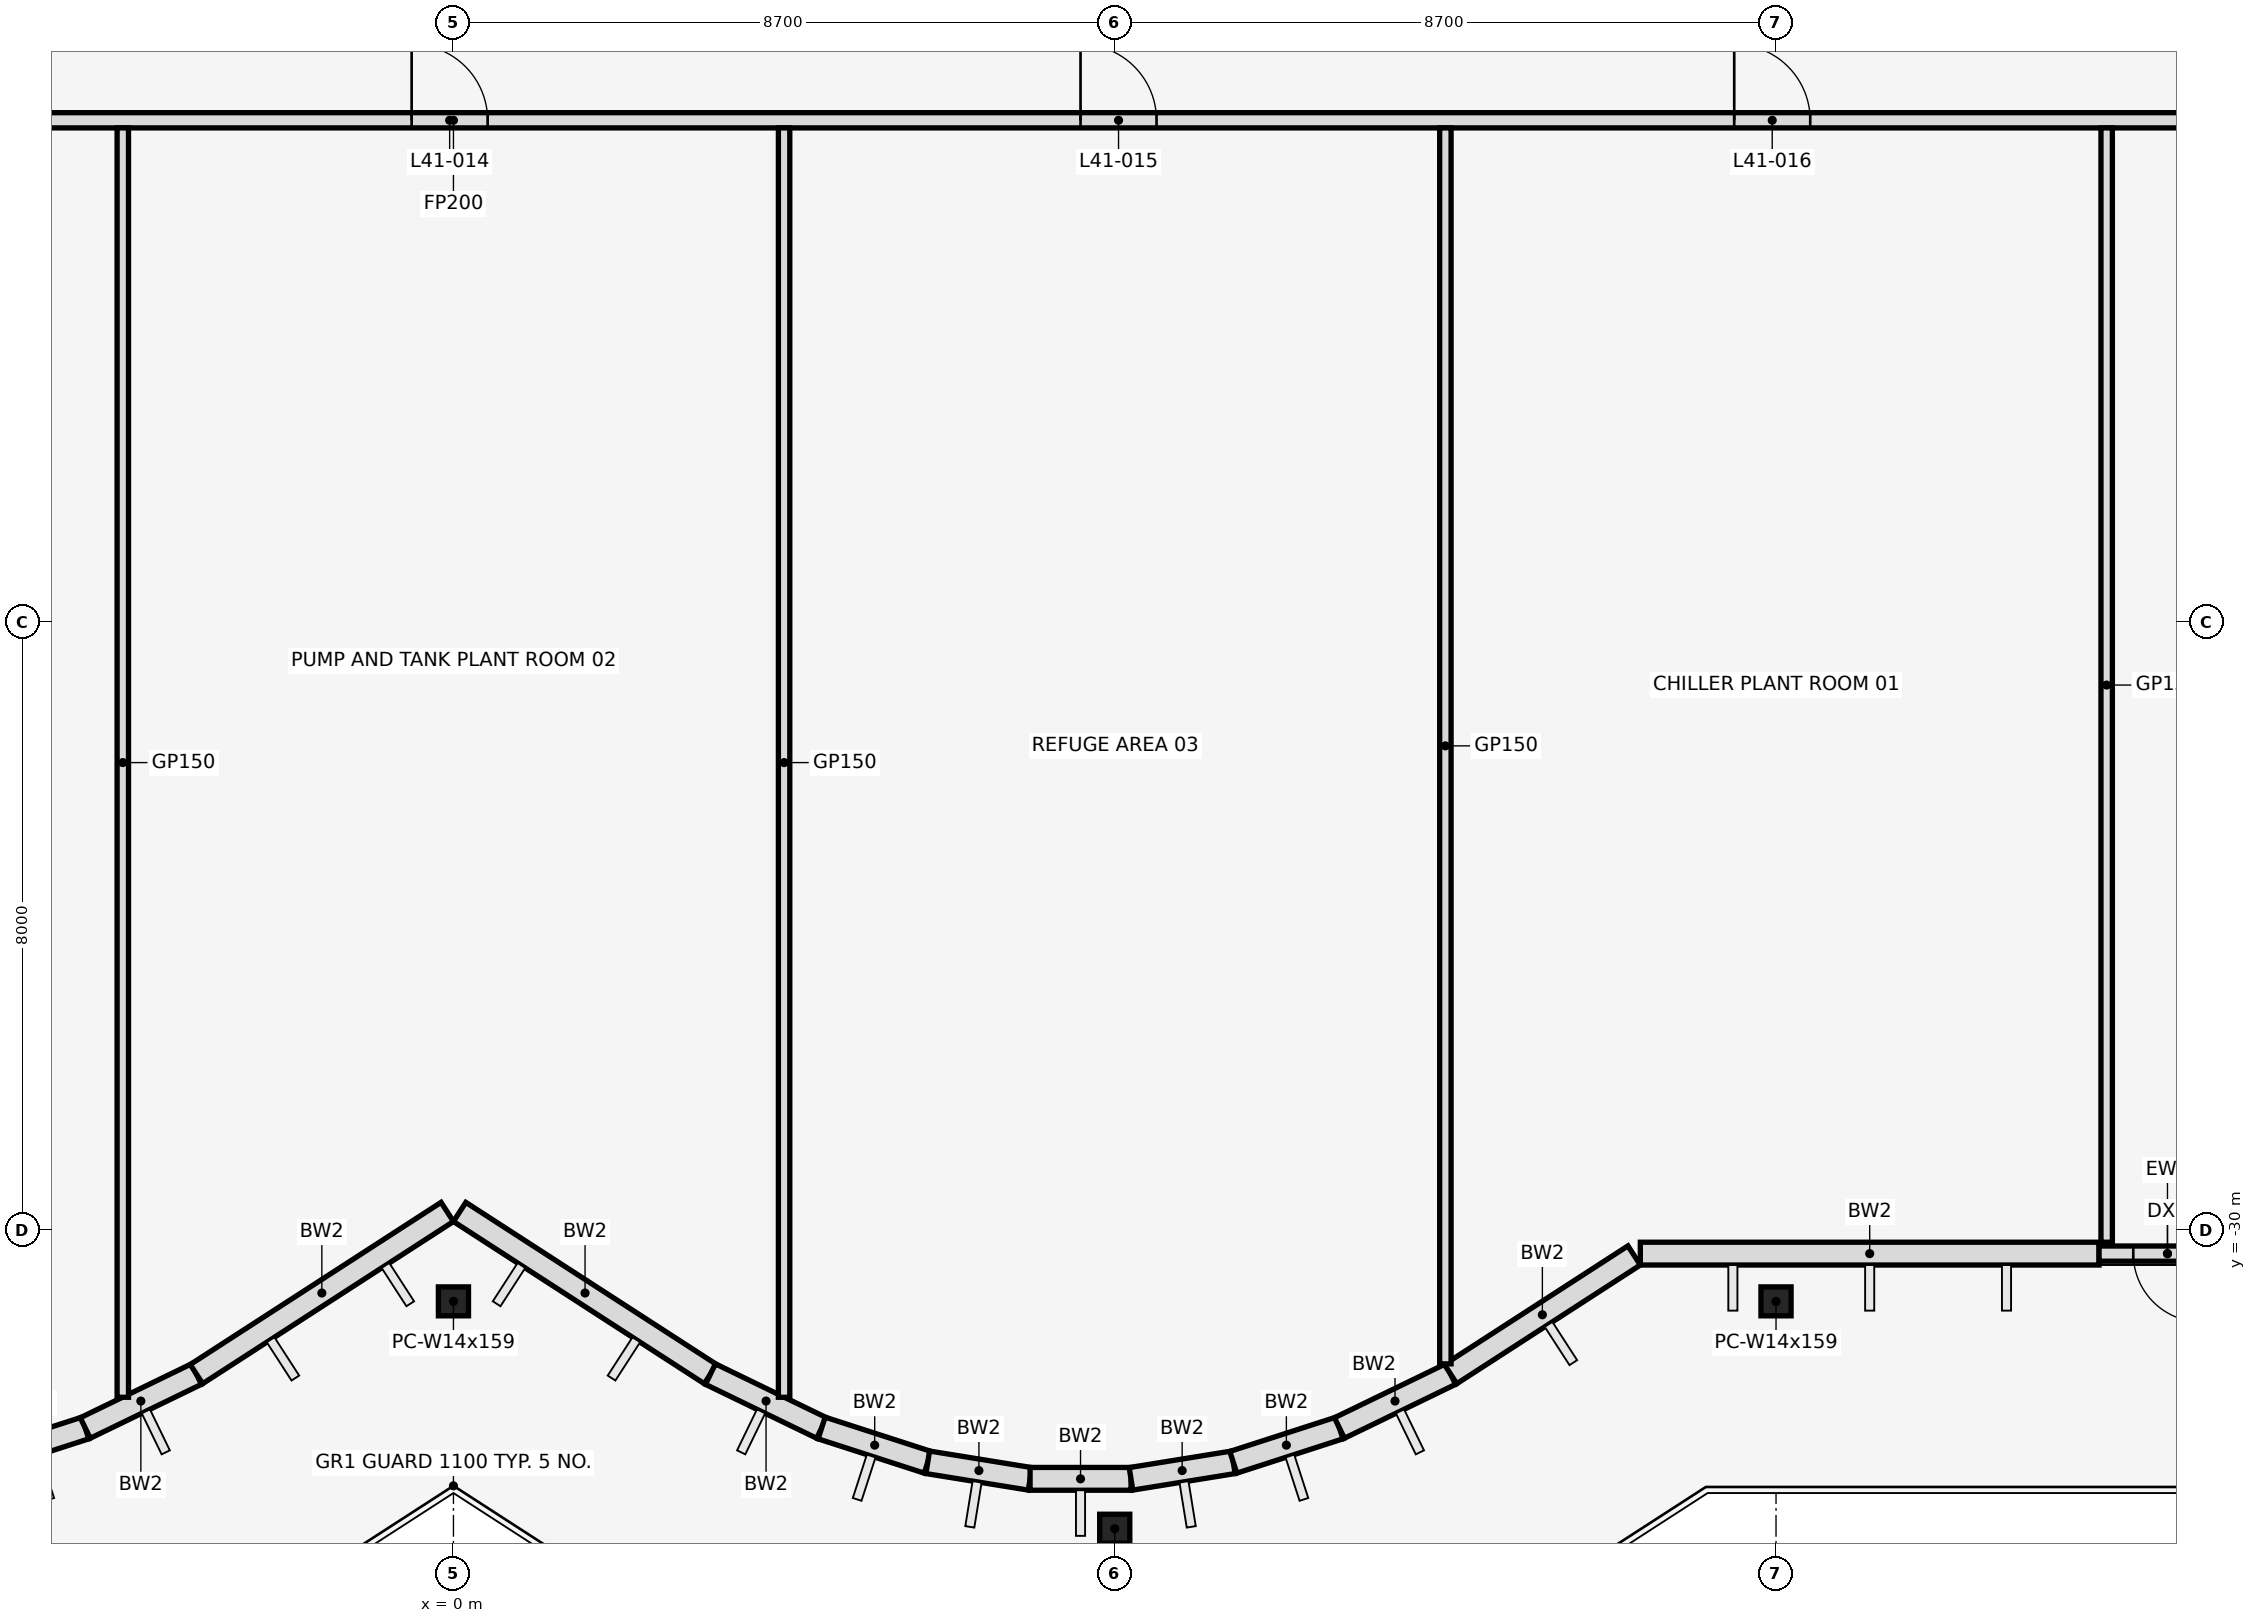
"""IFC4 building model, lengths in metres.
Left out: names, types, materials, properties, quantities, classifications, styles, units other than length and angle.
Written with IfcOpenShell. Run it as: python <this file> out.ifc"""

import sys

from ifc_helpers import new_model, si_unit, direction, frame, frame_2d, origin, origin_2d, place, context, subcontext, project, spatial, rectangle, i_section, extrude, element, fill, save


model = new_model("IFC4")
c1 = context("Model", 3, precision=1e-05, world=origin(), true_north=direction((0.0, 1.0)))
c2 = subcontext(c1, "Body", "Model", "MODEL_VIEW")
j1 = project(units=[si_unit("LENGTHUNIT", "METRE"), si_unit("PLANEANGLEUNIT", "RADIAN")], contexts=[c1])
p1 = place(None, origin())
s1 = spatial("IfcSite", under=j1, at=p1, CompositionType="ELEMENT")
p2 = place(p1, origin())
s2 = spatial("IfcBuilding", under=s1, at=p2, CompositionType="ELEMENT")
p3 = place(p2, frame((0.0, 0.0, 185.5)))
s3 = spatial("IfcBuildingStorey", under=s2, at=p3, CompositionType="ELEMENT", Elevation=185.5)
for number, where, z_axis, x_axis in (
    (1, (0.0, -30.938, 0.0), (0.0, 0.0, 1.0), (1.0, 0.0, 0.0)),
    (2, (8.7, -33.929, 0.0), (0.0, 0.0, 1.0), (1.0, 0.0, 0.0)),
    (3, (17.4, -30.938, 0.0), (0.0, 0.0, 1.0), (1.0, 0.0, 0.0)),
):
    element("IfcColumn", number, at=place(p3, frame(where, z_axis=z_axis, x_axis=x_axis)), inside=s3, PredefinedType="COLUMN", context=c2, shape_type="SweptSolid", body=[
        extrude(i_section(OverallWidth=0.396, OverallDepth=0.381, WebThickness=0.019, FlangeThickness=0.03, at=origin_2d()), origin(), (0.0, 0.0, 1.0), 5.4),
    ])
p4 = place(p3, frame((-6.24, -33.055, 0.0), z_axis=(0.0, 0.0, 1.0), x_axis=(0.951539081691, 0.307527845919, 0.0)))
e4 = element("IfcWall", 4, at=p4, inside=s3, PredefinedType="STANDARD", context=c2, shape_type="SweptSolid", body=[
    extrude(rectangle(XDim=1.467, YDim=0.3, at=frame_2d((0.733, 0.0))), origin(), (0.0, 0.0, 1.0), 5.25),
])
p5 = place(p3, frame((-4.844, -32.604, 0.0), z_axis=(0.0, 0.0, 1.0), x_axis=(0.899798026589, 0.436306671214, 0.0)))
e5 = element("IfcWall", 5, at=p5, inside=s3, PredefinedType="STANDARD", context=c2, shape_type="SweptSolid", body=[
    extrude(rectangle(XDim=1.625, YDim=0.3, at=frame_2d((0.813, 0.0))), origin(), (0.0, 0.0, 1.0), 4.346),
])
for number, where, z_axis, x_axis in (
    (6, (-3.381, -31.895, 0.0), (0.0, 0.0, 1.0), (0.84, 0.543, 0.0)),
    (7, (0.081, -29.762, 0.0), (0.0, 0.0, 1.0), (0.84, -0.543, 0.0)),
):
    element("IfcWall", number, at=place(p3, frame(where, z_axis=z_axis, x_axis=x_axis)), inside=s3, PredefinedType="STANDARD", context=c2, shape_type="SweptSolid", body=[
        extrude(rectangle(XDim=3.929, YDim=0.3, at=frame_2d((1.965, 0.0))), origin(), (0.0, 0.0, 1.0), 4.414),
    ])
p6 = place(p3, frame((3.381, -31.895, 0.0), z_axis=(0.0, 0.0, 1.0), x_axis=(0.899798026589, -0.436306671214, 0.0)))
e8 = element("IfcWall", 8, at=p6, inside=s3, PredefinedType="STANDARD", context=c2, shape_type="SweptSolid", body=[
    extrude(rectangle(XDim=1.625, YDim=0.3, at=frame_2d((0.813, 0.0))), origin(), (0.0, 0.0, 1.0), 4.346),
])
p7 = place(p3, frame((4.844, -32.604, 0.0), z_axis=(0.0, 0.0, 1.0), x_axis=(0.951539081691, -0.307527845919, 0.0)))
e9 = element("IfcWall", 9, at=p7, inside=s3, PredefinedType="STANDARD", context=c2, shape_type="SweptSolid", body=[
    extrude(rectangle(XDim=1.467, YDim=0.3, at=frame_2d((0.733, 0.0))), origin(), (0.0, 0.0, 1.0), 5.25),
])
p8 = place(p3, frame((6.24, -33.055, 0.0), z_axis=(0.0, 0.0, 1.0), x_axis=(0.987194777017, -0.15951950423, 0.0)))
e10 = element("IfcWall", 10, at=p8, inside=s3, PredefinedType="STANDARD", context=c2, shape_type="SweptSolid", body=[
    extrude(rectangle(XDim=1.364, YDim=0.3, at=frame_2d((0.682, 0.0))), origin(), (0.0, 0.0, 1.0), 5.25),
])
p9 = place(p3, frame((7.586, -33.273, 0.0), z_axis=(0.0, 0.0, 1.0), x_axis=(1.0, 0.0, 0.0)))
e11 = element("IfcWall", 11, at=p9, inside=s3, PredefinedType="STANDARD", context=c2, shape_type="SweptSolid", body=[
    extrude(rectangle(XDim=1.328, YDim=0.3, at=frame_2d((0.664, 0.0))), origin(), (0.0, 0.0, 1.0), 4.28),
])
p10 = place(p3, frame((8.914, -33.273, 0.0), z_axis=(0.0, 0.0, 1.0), x_axis=(0.987194777017, 0.15951950423, 0.0)))
e12 = element("IfcWall", 12, at=p10, inside=s3, PredefinedType="STANDARD", context=c2, shape_type="SweptSolid", body=[
    extrude(rectangle(XDim=1.364, YDim=0.3, at=frame_2d((0.682, 0.0))), origin(), (0.0, 0.0, 1.0), 4.28),
])
p11 = place(p3, frame((10.26, -33.055, 0.0), z_axis=(0.0, 0.0, 1.0), x_axis=(0.951539081691, 0.307527845919, 0.0)))
e13 = element("IfcWall", 13, at=p11, inside=s3, PredefinedType="STANDARD", context=c2, shape_type="SweptSolid", body=[
    extrude(rectangle(XDim=1.467, YDim=0.3, at=frame_2d((0.733, 0.0))), origin(), (0.0, 0.0, 1.0), 5.25),
])
p12 = place(p3, frame((11.656, -32.604, 0.0), z_axis=(0.0, 0.0, 1.0), x_axis=(0.899798026589, 0.436306671214, 0.0)))
e14 = element("IfcWall", 14, at=p12, inside=s3, PredefinedType="STANDARD", context=c2, shape_type="SweptSolid", body=[
    extrude(rectangle(XDim=1.625, YDim=0.3, at=frame_2d((0.813, 0.0))), origin(), (0.0, 0.0, 1.0), 4.346),
])
p13 = place(p3, frame((13.119, -31.895, 0.0), z_axis=(0.0, 0.0, 1.0), x_axis=(0.839779682339, 0.542927329512, 0.0)))
e15 = element("IfcWall", 15, at=p13, inside=s3, PredefinedType="STANDARD", context=c2, shape_type="SweptSolid", body=[
    extrude(rectangle(XDim=2.875, YDim=0.3, at=frame_2d((1.438, 0.0))), origin(), (0.0, 0.0, 1.0), 4.346),
])
p14 = place(p3, frame((15.615, -30.31, 0.0), z_axis=(0.0, 0.0, 1.0), x_axis=(1.0, 0.0, 0.0)))
e16 = element("IfcWall", 16, at=p14, inside=s3, PredefinedType="STANDARD", context=c2, shape_type="SweptSolid", body=[
    extrude(rectangle(XDim=6.035, YDim=0.3, at=frame_2d((3.018, 0.0))), origin(), (0.0, 0.0, 1.0), 4.414),
])
p15 = place(p3, frame((23.45, -30.31, 0.0), z_axis=(0.0, 0.0, 1.0), x_axis=(-1.0, 0.0, 0.0)))
e17 = element("IfcWall", 17, at=p15, inside=s3, PredefinedType="STANDARD", context=c2, shape_type="SweptSolid", body=[
    extrude(rectangle(XDim=1.8, YDim=0.2, at=frame_2d((0.9, 0.0))), origin(), (0.0, 0.0, 1.0), 5.25),
])
p16 = place(p15, frame((0.45, 0.0, 0.0)))
e18 = element("IfcOpeningElement", 18, at=p16, cuts=e17, PredefinedType="OPENING", context=c2, shape_type="SweptSolid", body=[
    extrude(rectangle(XDim=0.9, YDim=2.1, at=frame_2d((0.45, 1.05))), frame((0.0, 0.112, 0.0), z_axis=(0.0, -1.0, 0.0), x_axis=(1.0, 0.0, 0.0)), (0.0, 0.0, 1.0), 0.224),
])
p17 = place(p3, frame((-32.7, -15.4, 0.0), z_axis=(0.0, 0.0, 1.0), x_axis=(1.0, 0.0, 0.0)))
e19 = element("IfcWall", 19, at=p17, inside=s3, PredefinedType="PARTITIONING", context=c2, shape_type="SweptSolid", body=[
    extrude(rectangle(XDim=65.4, YDim=0.2, at=frame_2d((32.7, 0.0))), origin(), (0.0, 0.0, 1.0), 4.26),
])
p18 = place(p17, frame((0.7, 0.0, 0.0)))
e20 = element("IfcOpeningElement", 20, at=p18, cuts=e19, PredefinedType="OPENING", context=c2, shape_type="SweptSolid", body=[
    extrude(rectangle(XDim=0.9, YDim=2.1, at=frame_2d((0.45, 1.05))), frame((0.0, 0.112, 0.0), z_axis=(0.0, -1.0, 0.0), x_axis=(1.0, 0.0, 0.0)), (0.0, 0.0, 1.0), 0.224),
])
p19 = place(p17, frame((5.55, 0.0, 0.0)))
e21 = element("IfcOpeningElement", 21, at=p19, cuts=e19, PredefinedType="OPENING", context=c2, shape_type="SweptSolid", body=[
    extrude(rectangle(XDim=1.0, YDim=2.1, at=frame_2d((0.5, 1.05))), frame((0.0, 0.112, 0.0), z_axis=(0.0, -1.0, 0.0), x_axis=(1.0, 0.0, 0.0)), (0.0, 0.0, 1.0), 0.224),
])
p20 = place(p17, frame((14.85, 0.0, 0.0)))
e22 = element("IfcOpeningElement", 22, at=p20, cuts=e19, PredefinedType="OPENING", context=c2, shape_type="SweptSolid", body=[
    extrude(rectangle(XDim=0.9, YDim=2.1, at=frame_2d((0.45, 1.05))), frame((0.0, 0.112, 0.0), z_axis=(0.0, -1.0, 0.0), x_axis=(1.0, 0.0, 0.0)), (0.0, 0.0, 1.0), 0.224),
])
p21 = place(p17, frame((23.55, 0.0, 0.0)))
e23 = element("IfcOpeningElement", 23, at=p21, cuts=e19, PredefinedType="OPENING", context=c2, shape_type="SweptSolid", body=[
    extrude(rectangle(XDim=1.0, YDim=2.1, at=frame_2d((0.5, 1.05))), frame((0.0, 0.112, 0.0), z_axis=(0.0, -1.0, 0.0), x_axis=(1.0, 0.0, 0.0)), (0.0, 0.0, 1.0), 0.224),
])
p22 = place(p17, frame((32.15, 0.0, 0.0)))
e24 = element("IfcOpeningElement", 24, at=p22, cuts=e19, PredefinedType="OPENING", context=c2, shape_type="SweptSolid", body=[
    extrude(rectangle(XDim=1.0, YDim=2.1, at=frame_2d((0.5, 1.05))), frame((0.0, 0.112, 0.0), z_axis=(0.0, -1.0, 0.0), x_axis=(1.0, 0.0, 0.0)), (0.0, 0.0, 1.0), 0.224),
])
p23 = place(p17, frame((40.95, 0.0, 0.0)))
e25 = element("IfcOpeningElement", 25, at=p23, cuts=e19, PredefinedType="OPENING", context=c2, shape_type="SweptSolid", body=[
    extrude(rectangle(XDim=1.0, YDim=2.1, at=frame_2d((0.5, 1.05))), frame((0.0, 0.112, 0.0), z_axis=(0.0, -1.0, 0.0), x_axis=(1.0, 0.0, 0.0)), (0.0, 0.0, 1.0), 0.224),
])
p24 = place(p17, frame((49.55, 0.0, 0.0)))
e26 = element("IfcOpeningElement", 26, at=p24, cuts=e19, PredefinedType="OPENING", context=c2, shape_type="SweptSolid", body=[
    extrude(rectangle(XDim=1.0, YDim=2.1, at=frame_2d((0.5, 1.05))), frame((0.0, 0.112, 0.0), z_axis=(0.0, -1.0, 0.0), x_axis=(1.0, 0.0, 0.0)), (0.0, 0.0, 1.0), 0.224),
])
p25 = place(p17, frame((58.85, 0.0, 0.0)))
e27 = element("IfcOpeningElement", 27, at=p25, cuts=e19, PredefinedType="OPENING", context=c2, shape_type="SweptSolid", body=[
    extrude(rectangle(XDim=1.0, YDim=2.1, at=frame_2d((0.5, 1.05))), frame((0.0, 0.112, 0.0), z_axis=(0.0, -1.0, 0.0), x_axis=(1.0, 0.0, 0.0)), (0.0, 0.0, 1.0), 0.224),
])
p26 = place(p17, frame((63.85, 0.0, 0.0)))
e28 = element("IfcOpeningElement", 28, at=p26, cuts=e19, PredefinedType="OPENING", context=c2, shape_type="SweptSolid", body=[
    extrude(rectangle(XDim=0.9, YDim=2.1, at=frame_2d((0.45, 1.05))), frame((0.0, 0.112, 0.0), z_axis=(0.0, -1.0, 0.0), x_axis=(1.0, 0.0, 0.0)), (0.0, 0.0, 1.0), 0.224),
])
for number, where, z_axis, x_axis in (
    (29, (-4.35, -32.2, 0.0), (0.0, 0.0, 1.0), (0.0, 1.0, 0.0)),
    (30, (4.35, -32.2, 0.0), (0.0, 0.0, 1.0), (0.0, 1.0, 0.0)),
):
    element("IfcWall", number, at=place(p3, frame(where, z_axis=z_axis, x_axis=x_axis)), inside=s3, PredefinedType="PARTITIONING", context=c2, shape_type="SweptSolid", body=[
        extrude(rectangle(XDim=16.7, YDim=0.15, at=frame_2d((8.35, 0.0))), origin(), (0.0, 0.0, 1.0), 4.26),
    ])
p27 = place(p3, frame((13.05, -31.76, 0.0), z_axis=(0.0, 0.0, 1.0), x_axis=(0.0, 1.0, 0.0)))
e31 = element("IfcWall", 31, at=p27, inside=s3, PredefinedType="PARTITIONING", context=c2, shape_type="SweptSolid", body=[
    extrude(rectangle(XDim=16.26, YDim=0.15, at=frame_2d((8.13, 0.0))), origin(), (0.0, 0.0, 1.0), 4.26),
])
p28 = place(p3, frame((21.75, -30.16, 0.0), z_axis=(0.0, 0.0, 1.0), x_axis=(0.0, 1.0, 0.0)))
e32 = element("IfcWall", 32, at=p28, inside=s3, PredefinedType="PARTITIONING", context=c2, shape_type="SweptSolid", body=[
    extrude(rectangle(XDim=14.66, YDim=0.15, at=frame_2d((7.33, 0.0))), origin(), (0.0, 0.0, 1.0), 4.26),
])
p29 = place(p16, origin())
e33 = element("IfcDoor", 33, at=p29, inside=s3, OperationType="SINGLE_SWING_LEFT", PredefinedType="DOOR", context=c2, shape_type="SweptSolid", body=[
    extrude(rectangle(XDim=0.9, YDim=2.1, at=frame_2d((0.45, 1.05))), frame((0.0, 0.025, 0.0), z_axis=(0.0, -1.0, 0.0), x_axis=(1.0, 0.0, 0.0)), (0.0, 0.0, 1.0), 0.05),
])
fill(e18, e33)
p30 = place(p22, frame((1.0, 0.0, 0.0), z_axis=(0.0, 0.0, 1.0), x_axis=(-1.0, 0.0, 0.0)))
e34 = element("IfcDoor", 34, at=p30, inside=s3, OperationType="SINGLE_SWING_RIGHT", PredefinedType="DOOR", context=c2, shape_type="SweptSolid", body=[
    extrude(rectangle(XDim=1.0, YDim=2.1, at=frame_2d((0.5, 1.05))), frame((0.0, 0.025, 0.0), z_axis=(0.0, -1.0, 0.0), x_axis=(1.0, 0.0, 0.0)), (0.0, 0.0, 1.0), 0.05),
])
fill(e24, e34)
p31 = place(p23, frame((1.0, 0.0, 0.0), z_axis=(0.0, 0.0, 1.0), x_axis=(-1.0, 0.0, 0.0)))
e35 = element("IfcDoor", 35, at=p31, inside=s3, OperationType="SINGLE_SWING_RIGHT", PredefinedType="DOOR", context=c2, shape_type="SweptSolid", body=[
    extrude(rectangle(XDim=1.0, YDim=2.1, at=frame_2d((0.5, 1.05))), frame((0.0, 0.025, 0.0), z_axis=(0.0, -1.0, 0.0), x_axis=(1.0, 0.0, 0.0)), (0.0, 0.0, 1.0), 0.05),
])
fill(e25, e35)
p32 = place(p24, frame((1.0, 0.0, 0.0), z_axis=(0.0, 0.0, 1.0), x_axis=(-1.0, 0.0, 0.0)))
e36 = element("IfcDoor", 36, at=p32, inside=s3, OperationType="SINGLE_SWING_LEFT", PredefinedType="DOOR", context=c2, shape_type="SweptSolid", body=[
    extrude(rectangle(XDim=1.0, YDim=2.1, at=frame_2d((0.5, 1.05))), frame((0.0, 0.025, 0.0), z_axis=(0.0, -1.0, 0.0), x_axis=(1.0, 0.0, 0.0)), (0.0, 0.0, 1.0), 0.05),
])
fill(e26, e36)
save(model, sys.argv[1])
